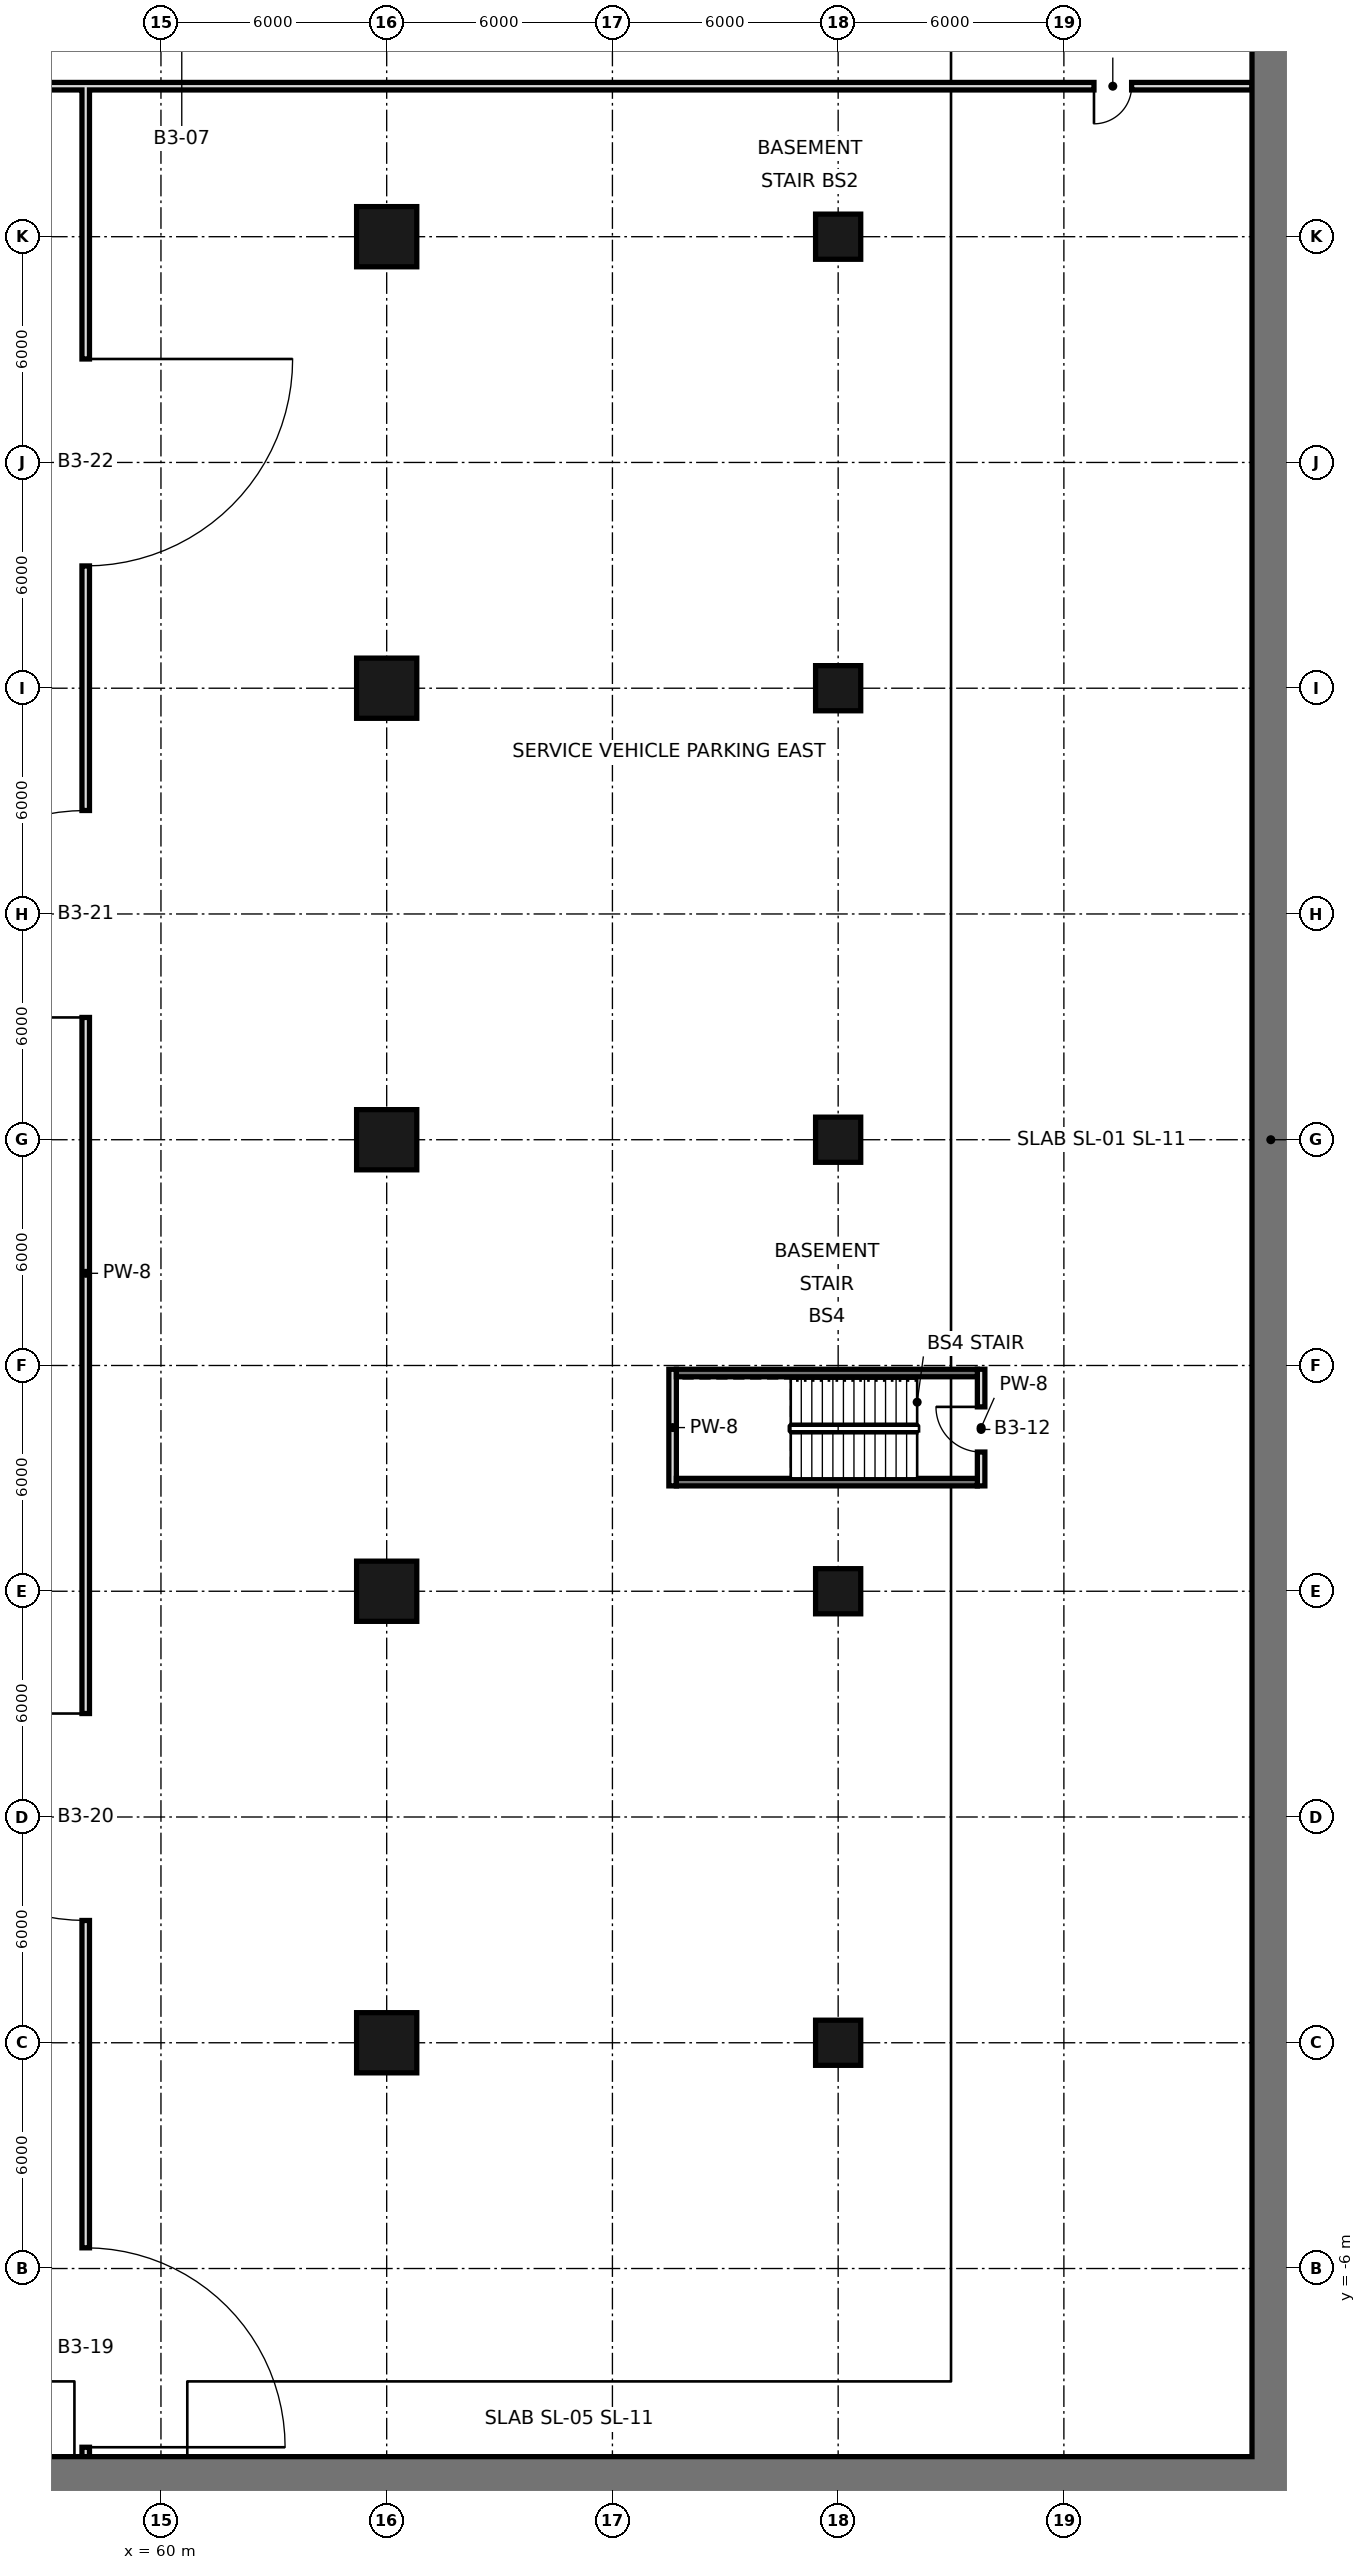
"""IFC4 building model, lengths in metres.
Left out: names, types, materials, properties, quantities, classifications, styles, units other than length and angle.
Written with IfcOpenShell. Run it as: python <this file> out.ifc"""

import sys

from ifc_helpers import new_model, si_unit, direction, frame, frame_2d, origin, origin_2d, place, context, subcontext, project, spatial, rectangle, extrude, element, fill, save


model = new_model("IFC4")
c1 = context("Model", 3, precision=1e-05, world=origin(), true_north=direction((0.0, 1.0)))
c2 = subcontext(c1, "Body", "Model", "MODEL_VIEW")
j1 = project(units=[si_unit("LENGTHUNIT", "METRE"), si_unit("PLANEANGLEUNIT", "RADIAN")], contexts=[c1])
p1 = place(None, origin())
s1 = spatial("IfcSite", under=j1, at=p1, CompositionType="ELEMENT")
p2 = place(p1, origin())
s2 = spatial("IfcBuilding", under=s1, at=p2, CompositionType="ELEMENT")
p3 = place(p2, frame((0.0, 0.0, -13.5)))
s3 = spatial("IfcBuildingStorey", under=s2, at=p3, CompositionType="ELEMENT", Elevation=-13.5)
p4 = place(p3, frame((89.5, -12.0, -26.5), z_axis=(0.0, 0.0, 1.0), x_axis=(0.0, 1.0, 0.0)))
e1 = element("IfcWall", 1, at=p4, inside=s3, PredefinedType="SOLIDWALL", context=c2, shape_type="SweptSolid", body=[
    extrude(rectangle(XDim=72.0, YDim=1.0, at=frame_2d((36.0, 0.0))), origin(), (0.0, 0.0, 1.0), 39.64),
])
p5 = place(p3, frame((-23.0, -11.5, -26.5), z_axis=(0.0, 0.0, 1.0), x_axis=(1.0, 0.0, 0.0)))
e2 = element("IfcWall", 2, at=p5, inside=s3, PredefinedType="SOLIDWALL", context=c2, shape_type="SweptSolid", body=[
    extrude(rectangle(XDim=112.0, YDim=1.0, at=frame_2d((56.0, 0.0))), origin(), (0.0, 0.0, 1.0), 39.64),
])
for number, where, z_axis, x_axis in (
    (3, (66.0, 0.0, 0.0), (0.0, 0.0, 1.0), (1.0, 0.0, 0.0)),
    (4, (66.0, 12.0, 0.0), (0.0, 0.0, 1.0), (1.0, 0.0, 0.0)),
    (5, (66.0, 24.0, 0.0), (0.0, 0.0, 1.0), (1.0, 0.0, 0.0)),
    (6, (66.0, 36.0, 0.0), (0.0, 0.0, 1.0), (1.0, 0.0, 0.0)),
    (7, (66.0, 48.0, 0.0), (0.0, 0.0, 1.0), (1.0, 0.0, 0.0)),
):
    element("IfcColumn", number, at=place(p3, frame(where, z_axis=z_axis, x_axis=x_axis)), inside=s3, PredefinedType="COLUMN", context=c2, shape_type="SweptSolid", body=[
        extrude(rectangle(XDim=1.6, YDim=1.6, at=origin_2d()), origin(), (0.0, 0.0, 1.0), 4.5),
    ])
for number, where, z_axis, x_axis in (
    (8, (78.0, 0.0, 0.0), (0.0, 0.0, 1.0), (1.0, 0.0, 0.0)),
    (9, (78.0, 12.0, 0.0), (0.0, 0.0, 1.0), (1.0, 0.0, 0.0)),
    (10, (78.0, 24.0, 0.0), (0.0, 0.0, 1.0), (1.0, 0.0, 0.0)),
    (11, (78.0, 36.0, 0.0), (0.0, 0.0, 1.0), (1.0, 0.0, 0.0)),
    (12, (78.0, 48.0, 0.0), (0.0, 0.0, 1.0), (1.0, 0.0, 0.0)),
):
    element("IfcColumn", number, at=place(p3, frame(where, z_axis=z_axis, x_axis=x_axis)), inside=s3, PredefinedType="COLUMN", context=c2, shape_type="SweptSolid", body=[
        extrude(rectangle(XDim=1.2, YDim=1.2, at=origin_2d()), origin(), (0.0, 0.0, 1.0), 4.5),
    ])
p6 = place(p3, frame((58.0, -11.0, 0.0), z_axis=(0.0, 0.0, 1.0), x_axis=(0.0, 1.0, 0.0)))
e13 = element("IfcWall", 13, at=p6, inside=s3, PredefinedType="SOLIDWALL", context=c2, shape_type="SweptSolid", body=[
    extrude(rectangle(XDim=62.9, YDim=0.2, at=frame_2d((31.45, 0.0))), origin(), (0.0, 0.0, 1.0), 3.05),
])
p7 = place(p6, frame((0.25, 0.0, 0.0)))
e14 = element("IfcOpeningElement", 14, at=p7, cuts=e13, PredefinedType="OPENING", context=c2, shape_type="SweptSolid", body=[
    extrude(rectangle(XDim=5.3, YDim=2.4, at=frame_2d((2.65, 1.2))), frame((0.0, 0.11, 0.0), z_axis=(0.0, -1.0, 0.0), x_axis=(1.0, 0.0, 0.0)), (0.0, 0.0, 1.0), 0.22),
])
p8 = place(p6, frame((14.25, 0.0, 0.0)))
e15 = element("IfcOpeningElement", 15, at=p8, cuts=e13, PredefinedType="OPENING", context=c2, shape_type="SweptSolid", body=[
    extrude(rectangle(XDim=5.5, YDim=2.4, at=frame_2d((2.75, 1.2))), frame((0.0, 0.11, 0.0), z_axis=(0.0, -1.0, 0.0), x_axis=(1.0, 0.0, 0.0)), (0.0, 0.0, 1.0), 0.22),
])
p9 = place(p6, frame((38.25, 0.0, 0.0)))
e16 = element("IfcOpeningElement", 16, at=p9, cuts=e13, PredefinedType="OPENING", context=c2, shape_type="SweptSolid", body=[
    extrude(rectangle(XDim=5.5, YDim=2.4, at=frame_2d((2.75, 1.2))), frame((0.0, 0.11, 0.0), z_axis=(0.0, -1.0, 0.0), x_axis=(1.0, 0.0, 0.0)), (0.0, 0.0, 1.0), 0.22),
])
p10 = place(p6, frame((50.25, 0.0, 0.0)))
e17 = element("IfcOpeningElement", 17, at=p10, cuts=e13, PredefinedType="OPENING", context=c2, shape_type="SweptSolid", body=[
    extrude(rectangle(XDim=5.5, YDim=2.4, at=frame_2d((2.75, 1.2))), frame((0.0, 0.11, 0.0), z_axis=(0.0, -1.0, 0.0), x_axis=(1.0, 0.0, 0.0)), (0.0, 0.0, 1.0), 0.22),
])
p11 = place(p3, frame((73.6, 14.8, 0.0), z_axis=(0.0, 0.0, 1.0), x_axis=(0.0, 1.0, 0.0)))
e18 = element("IfcWall", 18, at=p11, inside=s3, PredefinedType="SOLIDWALL", context=c2, shape_type="SweptSolid", body=[
    extrude(rectangle(XDim=3.1, YDim=0.2, at=frame_2d((1.55, 0.0))), origin(), (0.0, 0.0, 1.0), 4.15),
])
p12 = place(p3, frame((81.8, 14.8, 0.0), z_axis=(0.0, 0.0, 1.0), x_axis=(0.0, 1.0, 0.0)))
e19 = element("IfcWall", 19, at=p12, inside=s3, PredefinedType="SOLIDWALL", context=c2, shape_type="SweptSolid", body=[
    extrude(rectangle(XDim=3.1, YDim=0.2, at=frame_2d((1.55, 0.0))), origin(), (0.0, 0.0, 1.0), 4.15),
])
p13 = place(p12, frame((0.9, 0.0, 0.0)))
e20 = element("IfcOpeningElement", 20, at=p13, cuts=e19, PredefinedType="OPENING", context=c2, shape_type="SweptSolid", body=[
    extrude(rectangle(XDim=1.2, YDim=2.4, at=frame_2d((0.6, 1.2))), frame((0.0, 0.11, 0.0), z_axis=(0.0, -1.0, 0.0), x_axis=(1.0, 0.0, 0.0)), (0.0, 0.0, 1.0), 0.22),
])
for number, where, z_axis, x_axis in (
    (21, (73.7, 14.9, 0.0), (0.0, 0.0, 1.0), (1.0, 0.0, 0.0)),
    (22, (73.7, 17.8, 0.0), (0.0, 0.0, 1.0), (1.0, 0.0, 0.0)),
):
    element("IfcWall", number, at=place(p3, frame(where, z_axis=z_axis, x_axis=x_axis)), inside=s3, PredefinedType="SOLIDWALL", context=c2, shape_type="SweptSolid", body=[
        extrude(rectangle(XDim=8.0, YDim=0.2, at=frame_2d((4.0, 0.0))), origin(), (0.0, 0.0, 1.0), 4.15),
    ])
p14 = place(p3, frame((-23.0, 52.0, 0.0), z_axis=(0.0, 0.0, 1.0), x_axis=(1.0, 0.0, 0.0)))
e23 = element("IfcWall", 23, at=p14, inside=s3, PredefinedType="SOLIDWALL", context=c2, shape_type="SweptSolid", body=[
    extrude(rectangle(XDim=112.0, YDim=0.2, at=frame_2d((56.0, 0.0))), origin(), (0.0, 0.0, 1.0), 4.15),
])
p15 = place(p14, frame((3.25, 0.0, 0.0)))
e24 = element("IfcOpeningElement", 24, at=p15, cuts=e23, PredefinedType="OPENING", context=c2, shape_type="SweptSolid", body=[
    extrude(rectangle(XDim=1.0, YDim=2.4, at=frame_2d((0.5, 1.2))), frame((0.0, 0.11, 0.0), z_axis=(0.0, -1.0, 0.0), x_axis=(1.0, 0.0, 0.0)), (0.0, 0.0, 1.0), 0.22),
])
p16 = place(p14, frame((107.8, 0.0, 0.0)))
e25 = element("IfcOpeningElement", 25, at=p16, cuts=e23, PredefinedType="OPENING", context=c2, shape_type="SweptSolid", body=[
    extrude(rectangle(XDim=1.0, YDim=2.4, at=frame_2d((0.5, 1.2))), frame((0.0, 0.11, 0.0), z_axis=(0.0, -1.0, 0.0), x_axis=(1.0, 0.0, 0.0)), (0.0, 0.0, 1.0), 0.22),
])
p17 = place(p13, frame((1.2, 0.0, 0.0), z_axis=(0.0, 0.0, 1.0), x_axis=(-1.0, 0.0, 0.0)))
e26 = element("IfcDoor", 26, at=p17, inside=s3, OperationType="SINGLE_SWING_LEFT", PredefinedType="DOOR", context=c2, shape_type="SweptSolid", body=[
    extrude(rectangle(XDim=1.2, YDim=2.4, at=frame_2d((0.6, 1.2))), frame((0.0, 0.025, 0.0), z_axis=(0.0, -1.0, 0.0), x_axis=(1.0, 0.0, 0.0)), (0.0, 0.0, 1.0), 0.05),
])
fill(e20, e26)
p18 = place(p16, frame((1.0, 0.0, 0.0), z_axis=(0.0, 0.0, 1.0), x_axis=(-1.0, 0.0, 0.0)))
e27 = element("IfcDoor", 27, at=p18, inside=s3, OperationType="SINGLE_SWING_RIGHT", PredefinedType="DOOR", context=c2, shape_type="SweptSolid", body=[
    extrude(rectangle(XDim=1.0, YDim=2.4, at=frame_2d((0.5, 1.2))), frame((0.0, 0.025, 0.0), z_axis=(0.0, -1.0, 0.0), x_axis=(1.0, 0.0, 0.0)), (0.0, 0.0, 1.0), 0.05),
])
fill(e25, e27)
p19 = place(p7, frame((5.3, 0.0, 0.0), z_axis=(0.0, 0.0, 1.0), x_axis=(-1.0, 0.0, 0.0)))
e28 = element("IfcDoor", 28, at=p19, inside=s3, OperationType="SINGLE_SWING_RIGHT", PredefinedType="DOOR", context=c2, shape_type="SweptSolid", body=[
    extrude(rectangle(XDim=5.3, YDim=2.4, at=frame_2d((2.65, 1.2))), frame((0.0, 0.025, 0.0), z_axis=(0.0, -1.0, 0.0), x_axis=(1.0, 0.0, 0.0)), (0.0, 0.0, 1.0), 0.05),
])
fill(e14, e28)
p20 = place(p8, frame((5.5, 0.0, 0.0), z_axis=(0.0, 0.0, 1.0), x_axis=(-1.0, 0.0, 0.0)))
e29 = element("IfcDoor", 29, at=p20, inside=s3, OperationType="SINGLE_SWING_LEFT", PredefinedType="DOOR", context=c2, shape_type="SweptSolid", body=[
    extrude(rectangle(XDim=5.5, YDim=2.4, at=frame_2d((2.75, 1.2))), frame((0.0, 0.025, 0.0), z_axis=(0.0, -1.0, 0.0), x_axis=(1.0, 0.0, 0.0)), (0.0, 0.0, 1.0), 0.05),
])
fill(e15, e29)
p21 = place(p9, origin())
e30 = element("IfcDoor", 30, at=p21, inside=s3, OperationType="SINGLE_SWING_LEFT", PredefinedType="DOOR", context=c2, shape_type="SweptSolid", body=[
    extrude(rectangle(XDim=5.5, YDim=2.4, at=frame_2d((2.75, 1.2))), frame((0.0, 0.025, 0.0), z_axis=(0.0, -1.0, 0.0), x_axis=(1.0, 0.0, 0.0)), (0.0, 0.0, 1.0), 0.05),
])
fill(e16, e30)
p22 = place(p10, origin())
e31 = element("IfcDoor", 31, at=p22, inside=s3, OperationType="SINGLE_SWING_RIGHT", PredefinedType="DOOR", context=c2, shape_type="SweptSolid", body=[
    extrude(rectangle(XDim=5.5, YDim=2.4, at=frame_2d((2.75, 1.2))), frame((0.0, 0.025, 0.0), z_axis=(0.0, -1.0, 0.0), x_axis=(1.0, 0.0, 0.0)), (0.0, 0.0, 1.0), 0.05),
])
fill(e17, e31)
save(model, sys.argv[1])
